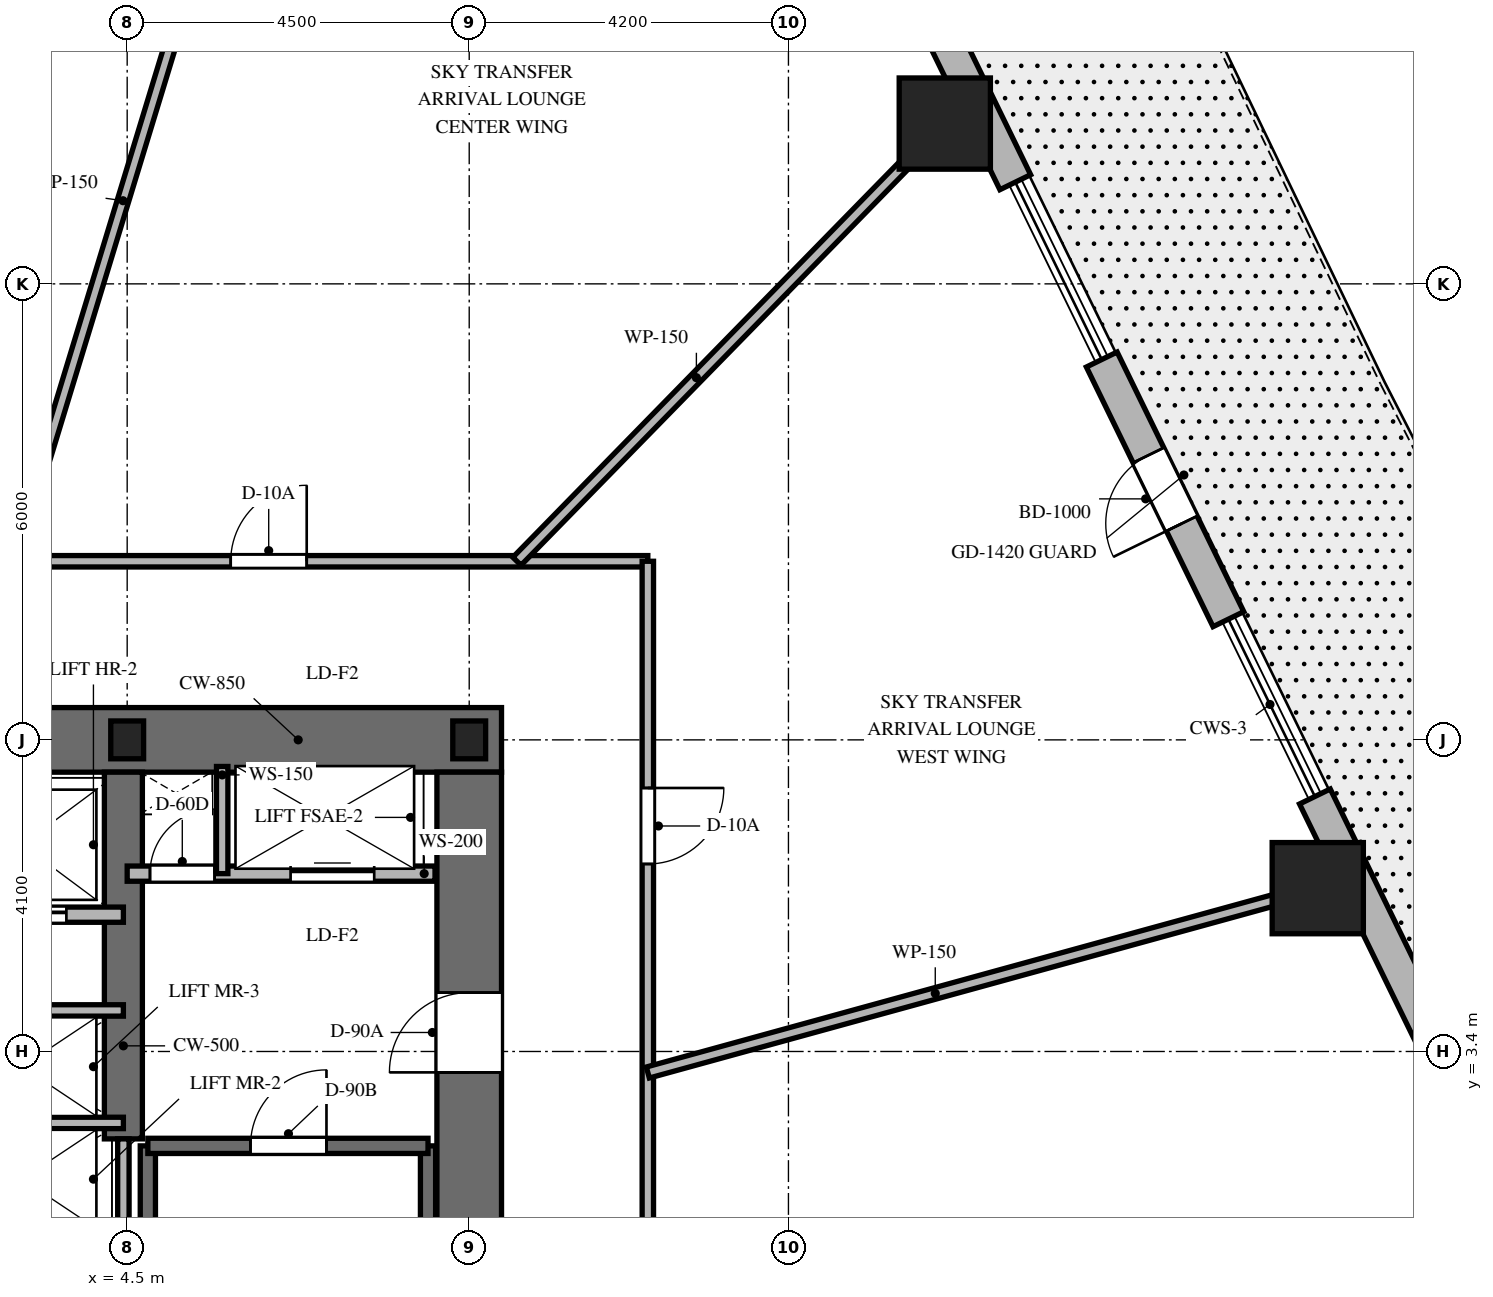
"""IFC4 building model, lengths in metres.
Left out: names, types, materials, properties, quantities, classifications, styles, units other than length and angle.
Written with IfcOpenShell. Run it as: python <this file> out.ifc"""

import sys

from ifc_helpers import new_model, si_unit, direction, frame, frame_2d, origin, origin_2d, place, context, subcontext, project, spatial, rectangle, i_section, extrude, element, fill, save


model = new_model("IFC4")
c1 = context("Model", 3, precision=1e-05, world=origin(), true_north=direction((0.0, 1.0)))
c2 = subcontext(c1, "Body", "Model", "MODEL_VIEW")
j1 = project(units=[si_unit("LENGTHUNIT", "METRE"), si_unit("PLANEANGLEUNIT", "RADIAN")], contexts=[c1])
p1 = place(None, origin())
s1 = spatial("IfcSite", under=j1, at=p1, CompositionType="ELEMENT")
p2 = place(p1, origin())
s2 = spatial("IfcBuilding", under=s1, at=p2, CompositionType="ELEMENT")
p3 = place(p2, frame((0.0, 0.0, 139.5)))
s3 = spatial("IfcBuildingStorey", under=s2, at=p3, CompositionType="ELEMENT", Elevation=139.5)
p4 = place(p3, frame((1.85, 7.5, 0.0), z_axis=(0.0, 0.0, 1.0), x_axis=(1.0, 0.0, 0.0)))
e1 = element("IfcWall", 1, at=p4, inside=s3, PredefinedType="SHEAR", context=c2, shape_type="SweptSolid", body=[
    extrude(rectangle(XDim=7.575, YDim=0.85, at=frame_2d((3.788, 0.0))), origin(), (0.0, 0.0, 1.0), 4.8),
])
p5 = place(p3, frame((9.0, -7.075, 0.0), z_axis=(0.0, 0.0, 1.0), x_axis=(0.0, 1.0, 0.0)))
e2 = element("IfcWall", 2, at=p5, inside=s3, PredefinedType="SHEAR", context=c2, shape_type="SweptSolid", body=[
    extrude(rectangle(XDim=14.15, YDim=0.85, at=frame_2d((7.075, 0.0))), origin(), (0.0, 0.0, 1.0), 4.8),
])
p6 = place(p5, frame((10.2, 0.0, 0.0)))
e3 = element("IfcOpeningElement", 3, at=p6, cuts=e2, PredefinedType="OPENING", context=c2, shape_type="SweptSolid", body=[
    extrude(rectangle(XDim=1.05, YDim=2.15, at=frame_2d((0.525, 1.075))), frame((0.0, 0.435, 0.0), z_axis=(0.0, -1.0, 0.0), x_axis=(1.0, 0.0, 0.0)), (0.0, 0.0, 1.0), 0.87),
])
p7 = place(p3, frame((4.45, 2.25, 0.0), z_axis=(0.0, 0.0, 1.0), x_axis=(0.0, 1.0, 0.0)))
e4 = element("IfcWall", 4, at=p7, inside=s3, PredefinedType="SHEAR", context=c2, shape_type="SweptSolid", body=[
    extrude(rectangle(XDim=4.825, YDim=0.5, at=frame_2d((2.413, 0.0))), origin(), (0.0, 0.0, 1.0), 4.8),
])
for number, where, z_axis, x_axis in (
    (5, (4.772, -6.985, 0.0), (0.0, 0.0, 1.0), (0.0, 1.0, 0.0)),
    (6, (8.458, -6.985, 0.0), (0.0, 0.0, 1.0), (0.0, 1.0, 0.0)),
):
    element("IfcWall", number, at=place(p3, frame(where, z_axis=z_axis, x_axis=x_axis)), inside=s3, PredefinedType="SHEAR", context=c2, shape_type="SweptSolid", body=[
        extrude(rectangle(XDim=9.143, YDim=0.2, at=frame_2d((4.572, 0.0))), origin(), (0.0, 0.0, 1.0), 4.8),
    ])
p8 = place(p3, frame((4.772, 2.158, 0.0), z_axis=(0.0, 0.0, 1.0), x_axis=(1.0, 0.0, 0.0)))
e7 = element("IfcWall", 7, at=p8, inside=s3, PredefinedType="SHEAR", context=c2, shape_type="SweptSolid", body=[
    extrude(rectangle(XDim=3.686, YDim=0.2, at=frame_2d((1.843, 0.0))), origin(), (0.0, 0.0, 1.0), 4.8),
])
p9 = place(p8, frame((1.35, 0.0, 0.0)))
e8 = element("IfcOpeningElement", 8, at=p9, cuts=e7, PredefinedType="OPENING", context=c2, shape_type="SweptSolid", body=[
    extrude(rectangle(XDim=1.0, YDim=2.15, at=frame_2d((0.5, 1.075))), frame((0.0, 0.11, 0.0), z_axis=(0.0, -1.0, 0.0), x_axis=(1.0, 0.0, 0.0)), (0.0, 0.0, 1.0), 0.22),
])
for number, where, z_axis, x_axis in (
    (9, (9.0, 7.5, 0.0), (0.0, 0.0, 1.0), (1.0, 0.0, 0.0)),
    (10, (4.5, 7.5, 0.0), (0.0, 0.0, 1.0), (1.0, 0.0, 0.0)),
):
    element("IfcColumn", number, at=place(p3, frame(where, z_axis=z_axis, x_axis=x_axis)), inside=s3, PredefinedType="COLUMN", context=c2, shape_type="SweptSolid", body=[
        extrude(i_section(OverallWidth=0.432, OverallDepth=0.498, WebThickness=0.056, FlangeThickness=0.089, at=origin_2d()), origin(), (0.0, 0.0, 1.0), 4.8),
    ])
for number, where, z_axis, x_axis in (
    (11, (20.164, 5.549, 0.0), (0.0, 0.0, 1.0), (1.0, 0.0, 0.0)),
    (12, (15.257, 15.609, 0.0), (0.0, 0.0, 1.0), (1.0, 0.0, 0.0)),
):
    element("IfcColumn", number, at=place(p3, frame(where, z_axis=z_axis, x_axis=x_axis)), inside=s3, PredefinedType="COLUMN", context=c2, shape_type="SweptSolid", body=[
        extrude(rectangle(XDim=1.2, YDim=1.2, at=origin_2d()), origin(), (0.0, 0.0, 1.0), 4.8),
    ])
p10 = place(p3, frame((22.238, 2.427, 0.0), z_axis=(0.0, 0.0, 1.0), x_axis=(-0.438370693728, 0.898794267272, 0.0)))
e13 = element("IfcWall", 13, at=p10, inside=s3, PredefinedType="SOLIDWALL", context=c2, shape_type="SweptSolid", body=[
    extrude(rectangle(XDim=4.816, YDim=0.45, at=frame_2d((2.408, 0.0))), origin(), (0.0, 0.0, 1.0), 4.5),
])
p11 = place(p3, frame((18.988, 9.088, 0.0), z_axis=(0.0, 0.0, 1.0), x_axis=(-0.43837933929, 0.898790050503, 0.0)))
e14 = element("IfcWall", 14, at=p11, inside=s3, PredefinedType="SOLIDWALL", context=c2, shape_type="SweptSolid", body=[
    extrude(rectangle(XDim=3.801, YDim=0.45, at=frame_2d((1.9, 0.0))), origin(), (0.0, 0.0, 1.0), 4.5),
])
p12 = place(p11, frame((1.4, 0.0, 0.0)))
e15 = element("IfcOpeningElement", 15, at=p12, cuts=e14, PredefinedType="OPENING", context=c2, shape_type="SweptSolid", body=[
    extrude(rectangle(XDim=1.0, YDim=2.15, at=frame_2d((0.5, 1.075))), frame((0.0, 0.235, 0.0), z_axis=(0.0, -1.0, 0.0), x_axis=(1.0, 0.0, 0.0)), (0.0, 0.0, 1.0), 0.47),
])
p13 = place(p3, frame((16.184, 14.838, 0.0), z_axis=(0.0, 0.0, 1.0), x_axis=(-0.43837962648, 0.898789910428, 0.0)))
e16 = element("IfcWall", 16, at=p13, inside=s3, PredefinedType="SOLIDWALL", context=c2, shape_type="SweptSolid", body=[
    extrude(rectangle(XDim=4.81, YDim=0.45, at=frame_2d((2.405, 0.0))), origin(), (0.0, 0.0, 1.0), 4.5),
])
p14 = place(p3, frame((4.5, 5.74, 0.0), z_axis=(0.0, 0.0, 1.0), x_axis=(1.0, 0.0, 0.0)))
e17 = element("IfcWall", 17, at=p14, inside=s3, PredefinedType="PARTITIONING", context=c2, shape_type="SweptSolid", body=[
    extrude(rectangle(XDim=4.05, YDim=0.2, at=frame_2d((2.025, 0.0))), origin(), (0.0, 0.0, 1.0), 4.5),
])
p15 = place(p14, frame((0.3, 0.0, 0.0)))
e18 = element("IfcOpeningElement", 18, at=p15, cuts=e17, PredefinedType="OPENING", context=c2, shape_type="SweptSolid", body=[
    extrude(rectangle(XDim=0.85, YDim=2.03, at=frame_2d((0.425, 1.015))), frame((0.0, 0.11, 0.0), z_axis=(0.0, -1.0, 0.0), x_axis=(1.0, 0.0, 0.0)), (0.0, 0.0, 1.0), 0.22),
])
p16 = place(p14, frame((2.15, 0.0, 0.0)))
e19 = element("IfcOpeningElement", 19, at=p16, cuts=e17, PredefinedType="OPENING", context=c2, shape_type="SweptSolid", body=[
    extrude(rectangle(XDim=1.1, YDim=2.2, at=frame_2d((0.55, 1.1))), frame((0.0, 0.11, 0.0), z_axis=(0.0, -1.0, 0.0), x_axis=(1.0, 0.0, 0.0)), (0.0, 0.0, 1.0), 0.22),
])
p17 = place(p3, frame((5.75, 5.74, 0.0), z_axis=(0.0, 0.0, 1.0), x_axis=(0.0, 1.0, 0.0)))
e20 = element("IfcWall", 20, at=p17, inside=s3, PredefinedType="PARTITIONING", context=c2, shape_type="SweptSolid", body=[
    extrude(rectangle(XDim=1.41, YDim=0.15, at=frame_2d((0.705, 0.0))), origin(), (0.0, 0.0, 1.0), 4.5),
])
p18 = place(p3, frame((1.85, 5.2, 0.0), z_axis=(0.0, 0.0, 1.0), x_axis=(1.0, 0.0, 0.0)))
e21 = element("IfcWall", 21, at=p18, inside=s3, PredefinedType="PARTITIONING", context=c2, shape_type="SweptSolid", body=[
    extrude(rectangle(XDim=2.6, YDim=0.2, at=frame_2d((1.3, 0.0))), origin(), (0.0, 0.0, 1.0), 4.5),
])
p19 = place(p18, frame((0.75, 0.0, 0.0)))
e22 = element("IfcOpeningElement", 22, at=p19, cuts=e21, PredefinedType="OPENING", context=c2, shape_type="SweptSolid", body=[
    extrude(rectangle(XDim=1.1, YDim=2.2, at=frame_2d((0.55, 1.1))), frame((0.0, 0.11, 0.0), z_axis=(0.0, -1.0, 0.0), x_axis=(1.0, 0.0, 0.0)), (0.0, 0.0, 1.0), 0.22),
])
p20 = place(p3, frame((4.45, -1.972, 0.0), z_axis=(0.0, 0.0, 1.0), x_axis=(0.0, 1.0, 0.0)))
e23 = element("IfcWall", 23, at=p20, inside=s3, PredefinedType="PARTITIONING", context=c2, shape_type="SweptSolid", body=[
    extrude(rectangle(XDim=4.222, YDim=0.15, at=frame_2d((2.111, 0.0))), origin(), (0.0, 0.0, 1.0), 4.5),
])
for number, where, z_axis, x_axis in (
    (24, (1.9, 3.94, 0.0), (0.0, 0.0, 1.0), (1.0, 0.0, 0.0)),
    (25, (1.9, 2.46, 0.0), (0.0, 0.0, 1.0), (1.0, 0.0, 0.0)),
):
    element("IfcWall", number, at=place(p3, frame(where, z_axis=z_axis, x_axis=x_axis)), inside=s3, PredefinedType="PARTITIONING", context=c2, shape_type="SweptSolid", body=[
        extrude(rectangle(XDim=2.55, YDim=0.15, at=frame_2d((1.275, 0.0))), origin(), (0.0, 0.0, 1.0), 4.5),
    ])
p21 = place(p3, frame((-11.35, 9.85, 0.0), z_axis=(0.0, 0.0, 1.0), x_axis=(1.0, 0.0, 0.0)))
e26 = element("IfcWall", 26, at=p21, inside=s3, PredefinedType="PARTITIONING", context=c2, shape_type="SweptSolid", body=[
    extrude(rectangle(XDim=22.7, YDim=0.15, at=frame_2d((11.35, 0.0))), origin(), (0.0, 0.0, 1.0), 2.69),
])
p22 = place(p21, frame((17.212, 0.0, 0.0)))
e27 = element("IfcOpeningElement", 27, at=p22, cuts=e26, PredefinedType="OPENING", context=c2, shape_type="SweptSolid", body=[
    extrude(rectangle(XDim=1.0, YDim=2.03, at=frame_2d((0.5, 1.015))), frame((0.0, 0.085, 0.0), z_axis=(0.0, -1.0, 0.0), x_axis=(1.0, 0.0, 0.0)), (0.0, 0.0, 1.0), 0.17),
])
p23 = place(p21, frame((10.425, 0.0, 0.0)))
e28 = element("IfcOpeningElement", 28, at=p23, cuts=e26, PredefinedType="OPENING", context=c2, shape_type="SweptSolid", body=[
    extrude(rectangle(XDim=1.0, YDim=2.03, at=frame_2d((0.5, 1.015))), frame((0.0, 0.085, 0.0), z_axis=(0.0, -1.0, 0.0), x_axis=(1.0, 0.0, 0.0)), (0.0, 0.0, 1.0), 0.17),
])
p24 = place(p21, frame((3.374, 0.0, 0.0)))
e29 = element("IfcOpeningElement", 29, at=p24, cuts=e26, PredefinedType="OPENING", context=c2, shape_type="SweptSolid", body=[
    extrude(rectangle(XDim=1.0, YDim=2.03, at=frame_2d((0.5, 1.015))), frame((0.0, 0.085, 0.0), z_axis=(0.0, -1.0, 0.0), x_axis=(1.0, 0.0, 0.0)), (0.0, 0.0, 1.0), 0.17),
])
p25 = place(p3, frame((11.35, 9.85, 0.0), z_axis=(0.0, 0.0, 1.0), x_axis=(0.0, -1.0, 0.0)))
e30 = element("IfcWall", 30, at=p25, inside=s3, PredefinedType="PARTITIONING", context=c2, shape_type="SweptSolid", body=[
    extrude(rectangle(XDim=19.7, YDim=0.15, at=frame_2d((9.85, 0.0))), origin(), (0.0, 0.0, 1.0), 2.69),
])
p26 = place(p25, frame((2.983, 0.0, 0.0)))
e31 = element("IfcOpeningElement", 31, at=p26, cuts=e30, PredefinedType="OPENING", context=c2, shape_type="SweptSolid", body=[
    extrude(rectangle(XDim=1.0, YDim=2.03, at=frame_2d((0.5, 1.015))), frame((0.0, 0.085, 0.0), z_axis=(0.0, -1.0, 0.0), x_axis=(1.0, 0.0, 0.0)), (0.0, 0.0, 1.0), 0.17),
])
p27 = place(p25, frame((15.18, 0.0, 0.0)))
e32 = element("IfcOpeningElement", 32, at=p27, cuts=e30, PredefinedType="OPENING", context=c2, shape_type="SweptSolid", body=[
    extrude(rectangle(XDim=1.0, YDim=2.03, at=frame_2d((0.5, 1.015))), frame((0.0, 0.085, 0.0), z_axis=(0.0, -1.0, 0.0), x_axis=(1.0, 0.0, 0.0)), (0.0, 0.0, 1.0), 0.17),
])
p28 = place(p25, frame((8.811, 0.0, 0.0)))
e33 = element("IfcOpeningElement", 33, at=p28, cuts=e30, PredefinedType="OPENING", context=c2, shape_type="SweptSolid", body=[
    extrude(rectangle(XDim=1.0, YDim=2.03, at=frame_2d((0.5, 1.015))), frame((0.0, 0.085, 0.0), z_axis=(0.0, -1.0, 0.0), x_axis=(1.0, 0.0, 0.0)), (0.0, 0.0, 1.0), 0.17),
])
p29 = place(p3, frame((11.35, 3.123, 0.0), z_axis=(0.0, 0.0, 1.0), x_axis=(0.964151983214, 0.265350623261, 0.0)))
e34 = element("IfcWall", 34, at=p29, inside=s3, PredefinedType="PARTITIONING", context=c2, shape_type="SweptSolid", body=[
    extrude(rectangle(XDim=9.645, YDim=0.15, at=frame_2d((4.823, 0.0))), origin(), (0.0, 0.0, 1.0), 2.69),
])
p30 = place(p3, frame((9.628, 9.85, 0.0), z_axis=(0.0, 0.0, 1.0), x_axis=(0.698992824326, 0.715128681805, 0.0)))
e35 = element("IfcWall", 35, at=p30, inside=s3, PredefinedType="PARTITIONING", context=c2, shape_type="SweptSolid", body=[
    extrude(rectangle(XDim=8.579, YDim=0.15, at=frame_2d((4.29, 0.0))), origin(), (0.0, 0.0, 1.0), 2.69),
])
p31 = place(p3, frame((3.0, 9.85, 0.0), z_axis=(0.0, 0.0, 1.0), x_axis=(0.291352035382, 0.95661590593, 0.0)))
e36 = element("IfcWall", 36, at=p31, inside=s3, PredefinedType="PARTITIONING", context=c2, shape_type="SweptSolid", body=[
    extrude(rectangle(XDim=11.734, YDim=0.15, at=frame_2d((5.867, 0.0))), origin(), (0.0, 0.0, 1.0), 2.69),
])
p32 = place(p12, origin())
e37 = element("IfcDoor", 37, at=p32, inside=s3, OperationType="SINGLE_SWING_LEFT", PredefinedType="DOOR", context=c2, shape_type="SweptSolid", body=[
    extrude(rectangle(XDim=1.0, YDim=2.15, at=frame_2d((0.5, 1.075))), frame((0.0, 0.025, 0.0), z_axis=(0.0, -1.0, 0.0), x_axis=(1.0, 0.0, 0.0)), (0.0, 0.0, 1.0), 0.05),
])
fill(e15, e37)
p33 = place(p9, origin())
e38 = element("IfcDoor", 38, at=p33, inside=s3, OperationType="SINGLE_SWING_RIGHT", PredefinedType="DOOR", context=c2, shape_type="SweptSolid", body=[
    extrude(rectangle(XDim=1.0, YDim=2.15, at=frame_2d((0.5, 1.075))), frame((0.0, 0.025, 0.0), z_axis=(0.0, -1.0, 0.0), x_axis=(1.0, 0.0, 0.0)), (0.0, 0.0, 1.0), 0.05),
])
fill(e8, e38)
p34 = place(p6, origin())
e39 = element("IfcDoor", 39, at=p34, inside=s3, OperationType="SINGLE_SWING_LEFT", PredefinedType="DOOR", context=c2, shape_type="SweptSolid", body=[
    extrude(rectangle(XDim=1.05, YDim=2.15, at=frame_2d((0.525, 1.075))), frame((0.0, 0.025, 0.0), z_axis=(0.0, -1.0, 0.0), x_axis=(1.0, 0.0, 0.0)), (0.0, 0.0, 1.0), 0.05),
])
fill(e3, e39)
p35 = place(p15, origin())
e40 = element("IfcDoor", 40, at=p35, inside=s3, OperationType="SINGLE_SWING_RIGHT", PredefinedType="DOOR", context=c2, shape_type="SweptSolid", body=[
    extrude(rectangle(XDim=0.85, YDim=2.03, at=frame_2d((0.425, 1.015))), frame((0.0, 0.025, 0.0), z_axis=(0.0, -1.0, 0.0), x_axis=(1.0, 0.0, 0.0)), (0.0, 0.0, 1.0), 0.05),
])
fill(e18, e40)
p36 = place(p16, origin())
e41 = element("IfcDoor", 41, at=p36, inside=s3, OperationType="SLIDING_TO_RIGHT", PredefinedType="DOOR", context=c2, shape_type="SweptSolid", body=[
    extrude(rectangle(XDim=1.1, YDim=2.2, at=frame_2d((0.55, 1.1))), frame((0.0, 0.025, 0.0), z_axis=(0.0, -1.0, 0.0), x_axis=(1.0, 0.0, 0.0)), (0.0, 0.0, 1.0), 0.05),
])
fill(e19, e41)
p37 = place(p19, origin())
e42 = element("IfcDoor", 42, at=p37, inside=s3, OperationType="SLIDING_TO_RIGHT", PredefinedType="DOOR", context=c2, shape_type="SweptSolid", body=[
    extrude(rectangle(XDim=1.1, YDim=2.2, at=frame_2d((0.55, 1.1))), frame((0.0, 0.025, 0.0), z_axis=(0.0, -1.0, 0.0), x_axis=(1.0, 0.0, 0.0)), (0.0, 0.0, 1.0), 0.05),
])
fill(e22, e42)
p38 = place(p26, origin())
e43 = element("IfcDoor", 43, at=p38, inside=s3, OperationType="SINGLE_SWING_LEFT", PredefinedType="DOOR", context=c2, shape_type="SweptSolid", body=[
    extrude(rectangle(XDim=1.0, YDim=2.03, at=frame_2d((0.5, 1.015))), frame((0.0, 0.025, 0.0), z_axis=(0.0, -1.0, 0.0), x_axis=(1.0, 0.0, 0.0)), (0.0, 0.0, 1.0), 0.05),
])
fill(e31, e43)
p39 = place(p22, origin())
e44 = element("IfcDoor", 44, at=p39, inside=s3, OperationType="SINGLE_SWING_RIGHT", PredefinedType="DOOR", context=c2, shape_type="SweptSolid", body=[
    extrude(rectangle(XDim=1.0, YDim=2.03, at=frame_2d((0.5, 1.015))), frame((0.0, 0.025, 0.0), z_axis=(0.0, -1.0, 0.0), x_axis=(1.0, 0.0, 0.0)), (0.0, 0.0, 1.0), 0.05),
])
fill(e27, e44)
save(model, sys.argv[1])
